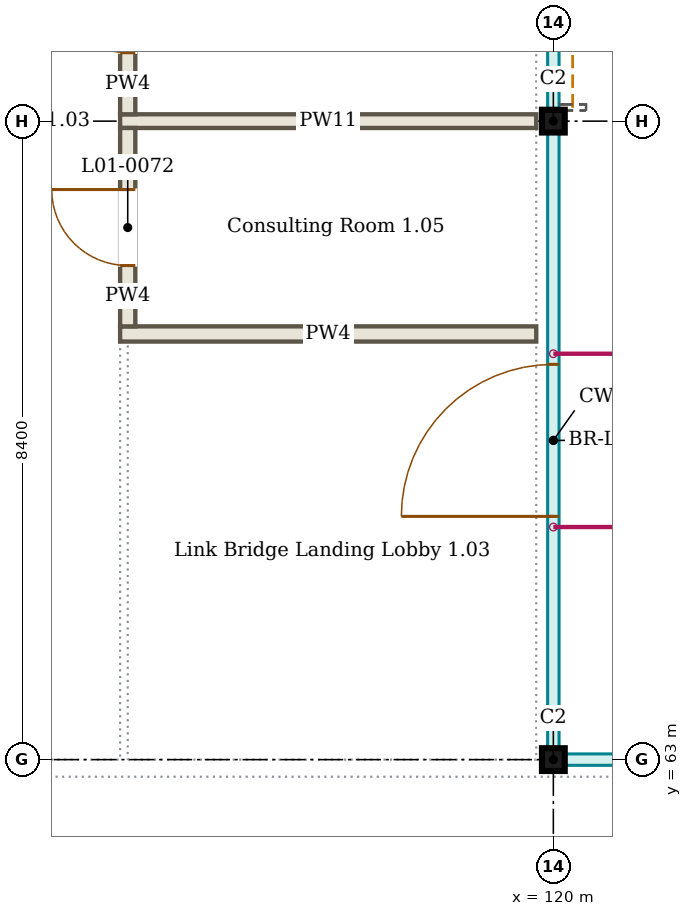
"""IFC4 building model, lengths in metres.
Left out: names, types, materials, properties, quantities, classifications, styles, units other than length and angle.
Written with IfcOpenShell. Run it as: python <this file> out.ifc"""

import sys

from ifc_helpers import new_model, si_unit, direction, frame, frame_2d, origin, origin_2d, place, context, subcontext, project, spatial, rectangle, i_section, extrude, element, fill, save


model = new_model("IFC4")
c1 = context("Model", 3, precision=1e-05, world=origin(), true_north=direction((0.0, 1.0)))
c2 = subcontext(c1, "Body", "Model", "MODEL_VIEW")
j1 = project(units=[si_unit("LENGTHUNIT", "METRE"), si_unit("PLANEANGLEUNIT", "RADIAN")], contexts=[c1])
p1 = place(None, origin())
s1 = spatial("IfcSite", under=j1, at=p1, CompositionType="ELEMENT")
p2 = place(p1, origin())
s2 = spatial("IfcBuilding", under=s1, at=p2, CompositionType="ELEMENT")
p3 = place(p2, frame((0.0, 0.0, 4.5)))
s3 = spatial("IfcBuildingStorey", under=s2, at=p3, CompositionType="ELEMENT", Elevation=4.5)
for number, where, z_axis, x_axis in (
    (1, (120.0, 63.0, 0.0), (0.0, 0.0, 1.0), (1.0, 0.0, 0.0)),
    (2, (120.0, 71.4, 0.0), (0.0, 0.0, 1.0), (1.0, 0.0, 0.0)),
):
    element("IfcColumn", number, at=place(p3, frame(where, z_axis=z_axis, x_axis=x_axis)), inside=s3, PredefinedType="COLUMN", context=c2, shape_type="SweptSolid", body=[
        extrude(i_section(OverallWidth=0.3, OverallDepth=0.3, WebThickness=0.011, FlangeThickness=0.019, FilletRadius=0.027, at=origin_2d()), origin(), (0.0, 0.0, 1.0), 4.5),
    ])
p4 = place(p3, frame((114.3, 68.6, 0.0), z_axis=(0.0, 0.0, 1.0), x_axis=(1.0, 0.0, 0.0)))
e3 = element("IfcWall", 3, at=p4, inside=s3, PredefinedType="PARTITIONING", context=c2, shape_type="SweptSolid", body=[
    extrude(rectangle(XDim=5.475, YDim=0.2, at=frame_2d((2.737, 0.0))), origin(), (0.0, 0.0, 1.0), 3.996),
])
p5 = place(p3, frame((114.3, 71.4, 0.0), z_axis=(0.0, 0.0, 1.0), x_axis=(1.0, 0.0, 0.0)))
e4 = element("IfcWall", 4, at=p5, inside=s3, PredefinedType="PARTITIONING", context=c2, shape_type="SweptSolid", body=[
    extrude(rectangle(XDim=5.475, YDim=0.18, at=frame_2d((2.737, 0.0))), origin(), (0.0, 0.0, 1.0), 3.9),
])
p6 = place(p3, frame((114.4, 68.7, 0.0), z_axis=(0.0, 0.0, 1.0), x_axis=(0.0, 1.0, 0.0)))
e5 = element("IfcWall", 5, at=p6, inside=s3, PredefinedType="PARTITIONING", context=c2, shape_type="SweptSolid", body=[
    extrude(rectangle(XDim=2.61, YDim=0.2, at=frame_2d((1.305, 0.0))), origin(), (0.0, 0.0, 1.0), 3.996),
])
p7 = place(p6, frame((0.8, 0.0, 0.0)))
e6 = element("IfcOpeningElement", 6, at=p7, cuts=e5, PredefinedType="OPENING", context=c2, shape_type="SweptSolid", body=[
    extrude(rectangle(XDim=1.0, YDim=2.1, at=frame_2d((0.5, 1.05))), frame((0.0, 0.11, 0.0), z_axis=(0.0, -1.0, 0.0), x_axis=(1.0, 0.0, 0.0)), (0.0, 0.0, 1.0), 0.22),
])
p8 = place(p3, frame((114.4, 71.49, 0.0), z_axis=(0.0, 0.0, 1.0), x_axis=(0.0, 1.0, 0.0)))
e7 = element("IfcWall", 7, at=p8, inside=s3, PredefinedType="PARTITIONING", context=c2, shape_type="SweptSolid", body=[
    extrude(rectangle(XDim=2.62, YDim=0.2, at=frame_2d((1.31, 0.0))), origin(), (0.0, 0.0, 1.0), 3.996),
])
p9 = place(p8, frame((0.81, 0.0, 0.0)))
e8 = element("IfcOpeningElement", 8, at=p9, cuts=e7, PredefinedType="OPENING", context=c2, shape_type="SweptSolid", body=[
    extrude(rectangle(XDim=1.0, YDim=2.1, at=frame_2d((0.5, 1.05))), frame((0.0, 0.11, 0.0), z_axis=(0.0, -1.0, 0.0), x_axis=(1.0, 0.0, 0.0)), (0.0, 0.0, 1.0), 0.22),
])
p10 = place(p3, frame((120.0, 63.15, 0.0), z_axis=(0.0, 0.0, 1.0), x_axis=(0.0, 1.0, 0.0)))
p11 = place(p10, frame((3.05, 0.0, 0.0)))
p12 = place(p11, origin())
e9 = element("IfcDoor", 9, at=p12, inside=s3, OperationType="SINGLE_SWING_LEFT", PredefinedType="DOOR", context=c2, shape_type="SweptSolid", body=[
    extrude(rectangle(XDim=2.0, YDim=2.4, at=frame_2d((1.0, 1.2))), frame((0.0, 0.025, 0.0), z_axis=(0.0, -1.0, 0.0), x_axis=(1.0, 0.0, 0.0)), (0.0, 0.0, 1.0), 0.05),
])
p13 = place(p7, origin())
e10 = element("IfcDoor", 10, at=p13, inside=s3, OperationType="SINGLE_SWING_RIGHT", PredefinedType="DOOR", context=c2, shape_type="SweptSolid", body=[
    extrude(rectangle(XDim=1.0, YDim=2.1, at=frame_2d((0.5, 1.05))), frame((0.0, 0.025, 0.0), z_axis=(0.0, -1.0, 0.0), x_axis=(1.0, 0.0, 0.0)), (0.0, 0.0, 1.0), 0.05),
])
fill(e6, e10)
p14 = place(p9, origin())
e11 = element("IfcDoor", 11, at=p14, inside=s3, OperationType="SINGLE_SWING_RIGHT", PredefinedType="DOOR", context=c2, shape_type="SweptSolid", body=[
    extrude(rectangle(XDim=1.0, YDim=2.1, at=frame_2d((0.5, 1.05))), frame((0.0, 0.025, 0.0), z_axis=(0.0, -1.0, 0.0), x_axis=(1.0, 0.0, 0.0)), (0.0, 0.0, 1.0), 0.05),
])
fill(e8, e11)
save(model, sys.argv[1])
